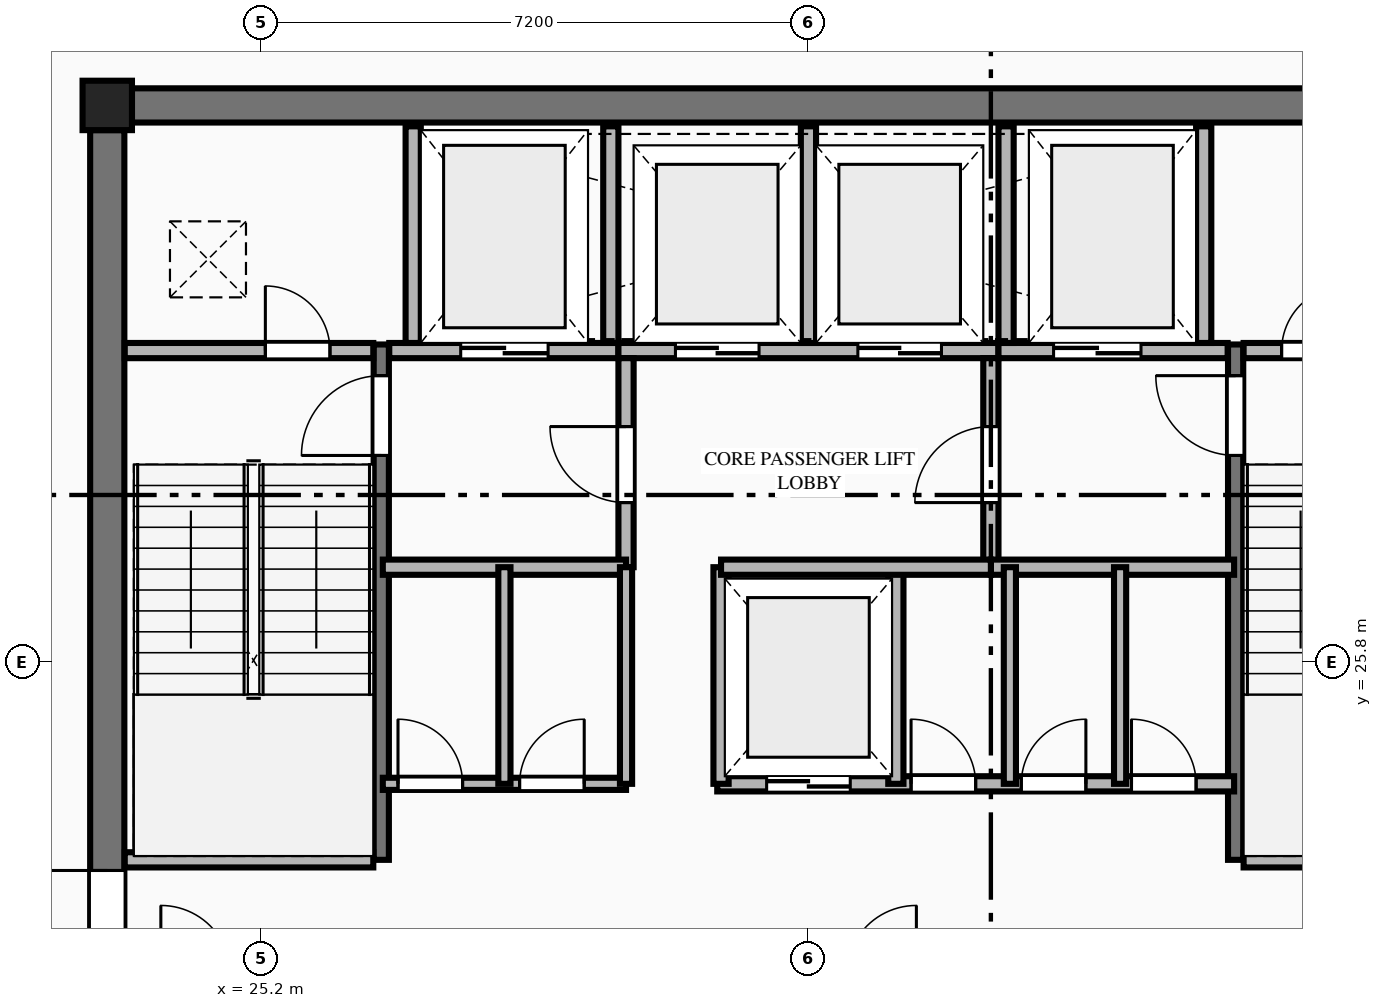
"""IFC4 building model, lengths in metres.
Left out: names, types, materials, properties, quantities, classifications, styles, units other than length and angle.
Written with IfcOpenShell. Run it as: python <this file> out.ifc"""

import sys

from ifc_helpers import new_model, si_unit, direction, frame, frame_2d, origin, origin_2d, place, context, subcontext, project, spatial, rectangle, extrude, element, fill, save


model = new_model("IFC4")
c1 = context("Model", 3, precision=1e-05, world=origin(), true_north=direction((0.0, 1.0)))
c2 = subcontext(c1, "Body", "Model", "MODEL_VIEW")
j1 = project(units=[si_unit("LENGTHUNIT", "METRE"), si_unit("PLANEANGLEUNIT", "RADIAN")], contexts=[c1])
p1 = place(None, origin())
s1 = spatial("IfcSite", under=j1, at=p1, CompositionType="ELEMENT")
p2 = place(p1, origin())
s2 = spatial("IfcBuilding", under=s1, at=p2, CompositionType="ELEMENT")
p3 = place(p2, frame((0.0, 0.0, 283.5)))
s3 = spatial("IfcBuildingStorey", under=s2, at=p3, CompositionType="ELEMENT", Elevation=283.5)
p4 = place(p3, frame((23.175, 33.125, 0.0), z_axis=(0.0, 0.0, 1.0), x_axis=(1.0, 0.0, 0.0)))
e1 = element("IfcColumn", 1, at=p4, inside=s3, PredefinedType="COLUMN", context=c2, shape_type="SweptSolid", body=[
    extrude(rectangle(XDim=0.65, YDim=0.65, at=origin_2d()), origin(), (0.0, 0.0, 1.0), 4.0),
])
p5 = place(p3, frame((23.5, 33.125, 0.0), z_axis=(0.0, 0.0, 1.0), x_axis=(1.0, 0.0, 0.0)))
e2 = element("IfcWall", 2, at=p5, inside=s3, PredefinedType="SHEAR", context=c2, shape_type="SweptSolid", body=[
    extrude(rectangle(XDim=17.8, YDim=0.45, at=frame_2d((8.9, 0.0))), origin(), (0.0, 0.0, 1.0), 3.8),
])
p6 = place(p3, frame((23.175, 19.0, 0.0), z_axis=(0.0, 0.0, 1.0), x_axis=(0.0, 1.0, 0.0)))
e3 = element("IfcWall", 3, at=p6, inside=s3, PredefinedType="SHEAR", context=c2, shape_type="SweptSolid", body=[
    extrude(rectangle(XDim=13.8, YDim=0.45, at=frame_2d((6.9, 0.0))), origin(), (0.0, 0.0, 1.0), 3.8),
])
p7 = place(p6, frame((2.84, 0.0, 0.0)))
e4 = element("IfcOpeningElement", 4, at=p7, cuts=e3, PredefinedType="OPENING", context=c2, shape_type="SweptSolid", body=[
    extrude(rectangle(XDim=1.22, YDim=2.25, at=frame_2d((0.61, 1.125))), frame((0.0, 0.235, 0.0), z_axis=(0.0, -1.0, 0.0), x_axis=(1.0, 0.0, 0.0)), (0.0, 0.0, 1.0), 0.47),
])
p8 = place(p3, frame((26.78, 23.2, 0.0), z_axis=(0.0, 0.0, 1.0), x_axis=(0.0, 1.0, 0.0)))
e5 = element("IfcWall", 5, at=p8, inside=s3, PredefinedType="SHEAR", context=c2, shape_type="SweptSolid", body=[
    extrude(rectangle(XDim=6.78, YDim=0.2, at=frame_2d((3.39, 0.0))), origin(), (0.0, 0.0, 1.0), 4.0),
])
p9 = place(p8, frame((5.32, 0.0, 0.0)))
e6 = element("IfcOpeningElement", 6, at=p9, cuts=e5, PredefinedType="OPENING", context=c2, shape_type="SweptSolid", body=[
    extrude(rectangle(XDim=1.05, YDim=2.15, at=frame_2d((0.525, 1.075))), frame((0.0, 0.11, 0.0), z_axis=(0.0, -1.0, 0.0), x_axis=(1.0, 0.0, 0.0)), (0.0, 0.0, 1.0), 0.22),
])
p10 = place(p3, frame((23.405, 23.2, 0.0), z_axis=(0.0, 0.0, 1.0), x_axis=(1.0, 0.0, 0.0)))
e7 = element("IfcWall", 7, at=p10, inside=s3, PredefinedType="PLUMBINGWALL", context=c2, shape_type="SweptSolid", body=[
    extrude(rectangle(XDim=3.27, YDim=0.2, at=frame_2d((1.635, 0.0))), origin(), (0.0, 0.0, 1.0), 3.8),
])
p11 = place(p3, frame((38.02, 23.2, 0.0), z_axis=(0.0, 0.0, 1.0), x_axis=(0.0, 1.0, 0.0)))
e8 = element("IfcWall", 8, at=p11, inside=s3, PredefinedType="SHEAR", context=c2, shape_type="SweptSolid", body=[
    extrude(rectangle(XDim=6.78, YDim=0.2, at=frame_2d((3.39, 0.0))), origin(), (0.0, 0.0, 1.0), 4.0),
])
p12 = place(p11, frame((5.32, 0.0, 0.0)))
e9 = element("IfcOpeningElement", 9, at=p12, cuts=e8, PredefinedType="OPENING", context=c2, shape_type="SweptSolid", body=[
    extrude(rectangle(XDim=1.05, YDim=2.15, at=frame_2d((0.525, 1.075))), frame((0.0, 0.11, 0.0), z_axis=(0.0, -1.0, 0.0), x_axis=(1.0, 0.0, 0.0)), (0.0, 0.0, 1.0), 0.22),
])
p13 = place(p3, frame((38.125, 23.2, 0.0), z_axis=(0.0, 0.0, 1.0), x_axis=(1.0, 0.0, 0.0)))
e10 = element("IfcWall", 10, at=p13, inside=s3, PredefinedType="PLUMBINGWALL", context=c2, shape_type="SweptSolid", body=[
    extrude(rectangle(XDim=3.27, YDim=0.2, at=frame_2d((1.635, 0.0))), origin(), (0.0, 0.0, 1.0), 3.8),
])
p14 = place(p3, frame((23.405, 29.9, 0.0), z_axis=(0.0, 0.0, 1.0), x_axis=(1.0, 0.0, 0.0)))
e11 = element("IfcWall", 11, at=p14, inside=s3, PredefinedType="PLUMBINGWALL", context=c2, shape_type="SweptSolid", body=[
    extrude(rectangle(XDim=3.27, YDim=0.2, at=frame_2d((1.635, 0.0))), origin(), (0.0, 0.0, 1.0), 3.8),
])
p15 = place(p14, frame((1.85, 0.0, 0.0)))
e12 = element("IfcOpeningElement", 12, at=p15, cuts=e11, PredefinedType="OPENING", context=c2, shape_type="SweptSolid", body=[
    extrude(rectangle(XDim=0.85, YDim=2.05, at=frame_2d((0.425, 1.025))), frame((0.0, 0.11, 0.0), z_axis=(0.0, -1.0, 0.0), x_axis=(1.0, 0.0, 0.0)), (0.0, 0.0, 1.0), 0.22),
])
p16 = place(p3, frame((26.885, 29.9, 0.0), z_axis=(0.0, 0.0, 1.0), x_axis=(1.0, 0.0, 0.0)))
e13 = element("IfcWall", 13, at=p16, inside=s3, PredefinedType="PLUMBINGWALL", context=c2, shape_type="SweptSolid", body=[
    extrude(rectangle(XDim=3.015, YDim=0.2, at=frame_2d((1.507, 0.0))), origin(), (0.0, 0.0, 1.0), 3.8),
])
p17 = place(p16, frame((0.94, 0.0, 0.0)))
e14 = element("IfcOpeningElement", 14, at=p17, cuts=e13, PredefinedType="OPENING", context=c2, shape_type="SweptSolid", body=[
    extrude(rectangle(XDim=1.15, YDim=2.2, at=frame_2d((0.575, 1.1))), frame((0.0, 0.11, 0.0), z_axis=(0.0, -1.0, 0.0), x_axis=(1.0, 0.0, 0.0)), (0.0, 0.0, 1.0), 0.22),
])
p18 = place(p3, frame((29.9, 29.9, 0.0), z_axis=(0.0, 0.0, 1.0), x_axis=(1.0, 0.0, 0.0)))
e15 = element("IfcWall", 15, at=p18, inside=s3, PredefinedType="PLUMBINGWALL", context=c2, shape_type="SweptSolid", body=[
    extrude(rectangle(XDim=5.0, YDim=0.2, at=frame_2d((2.5, 0.0))), origin(), (0.0, 0.0, 1.0), 3.8),
])
p19 = place(p18, frame((0.75, 0.0, 0.0)))
e16 = element("IfcOpeningElement", 16, at=p19, cuts=e15, PredefinedType="OPENING", context=c2, shape_type="SweptSolid", body=[
    extrude(rectangle(XDim=1.1, YDim=2.2, at=frame_2d((0.55, 1.1))), frame((0.0, 0.11, 0.0), z_axis=(0.0, -1.0, 0.0), x_axis=(1.0, 0.0, 0.0)), (0.0, 0.0, 1.0), 0.22),
])
p20 = place(p18, frame((3.15, 0.0, 0.0)))
e17 = element("IfcOpeningElement", 17, at=p20, cuts=e15, PredefinedType="OPENING", context=c2, shape_type="SweptSolid", body=[
    extrude(rectangle(XDim=1.1, YDim=2.2, at=frame_2d((0.55, 1.1))), frame((0.0, 0.11, 0.0), z_axis=(0.0, -1.0, 0.0), x_axis=(1.0, 0.0, 0.0)), (0.0, 0.0, 1.0), 0.22),
])
p21 = place(p3, frame((34.9, 29.9, 0.0), z_axis=(0.0, 0.0, 1.0), x_axis=(1.0, 0.0, 0.0)))
e18 = element("IfcWall", 18, at=p21, inside=s3, PredefinedType="PLUMBINGWALL", context=c2, shape_type="SweptSolid", body=[
    extrude(rectangle(XDim=3.015, YDim=0.2, at=frame_2d((1.508, 0.0))), origin(), (0.0, 0.0, 1.0), 3.8),
])
p22 = place(p21, frame((0.725, 0.0, 0.0)))
e19 = element("IfcOpeningElement", 19, at=p22, cuts=e18, PredefinedType="OPENING", context=c2, shape_type="SweptSolid", body=[
    extrude(rectangle(XDim=1.15, YDim=2.2, at=frame_2d((0.575, 1.1))), frame((0.0, 0.11, 0.0), z_axis=(0.0, -1.0, 0.0), x_axis=(1.0, 0.0, 0.0)), (0.0, 0.0, 1.0), 0.22),
])
p23 = place(p3, frame((38.125, 29.9, 0.0), z_axis=(0.0, 0.0, 1.0), x_axis=(1.0, 0.0, 0.0)))
e20 = element("IfcWall", 20, at=p23, inside=s3, PredefinedType="PLUMBINGWALL", context=c2, shape_type="SweptSolid", body=[
    extrude(rectangle(XDim=3.27, YDim=0.2, at=frame_2d((1.635, 0.0))), origin(), (0.0, 0.0, 1.0), 3.8),
])
p24 = place(p23, frame((0.5, 0.0, 0.0)))
e21 = element("IfcOpeningElement", 21, at=p24, cuts=e20, PredefinedType="OPENING", context=c2, shape_type="SweptSolid", body=[
    extrude(rectangle(XDim=0.85, YDim=2.05, at=frame_2d((0.425, 1.025))), frame((0.0, 0.11, 0.0), z_axis=(0.0, -1.0, 0.0), x_axis=(1.0, 0.0, 0.0)), (0.0, 0.0, 1.0), 0.22),
])
for number, where, z_axis, x_axis in (
    (22, (27.2, 30.0, 0.0), (0.0, 0.0, 1.0), (0.0, 1.0, 0.0)),
    (23, (29.8, 30.0, 0.0), (0.0, 0.0, 1.0), (0.0, 1.0, 0.0)),
    (24, (32.4, 30.0, 0.0), (0.0, 0.0, 1.0), (0.0, 1.0, 0.0)),
    (25, (35.0, 30.0, 0.0), (0.0, 0.0, 1.0), (0.0, 1.0, 0.0)),
    (26, (37.6, 30.0, 0.0), (0.0, 0.0, 1.0), (0.0, 1.0, 0.0)),
):
    element("IfcWall", number, at=place(p3, frame(where, z_axis=z_axis, x_axis=x_axis)), inside=s3, PredefinedType="PLUMBINGWALL", context=c2, shape_type="SweptSolid", body=[
        extrude(rectangle(XDim=2.85, YDim=0.2, at=frame_2d((1.425, 0.0))), origin(), (0.0, 0.0, 1.0), 3.8),
    ])
p25 = place(p3, frame((30.0, 27.05, 0.0), z_axis=(0.0, 0.0, 1.0), x_axis=(0.0, 1.0, 0.0)))
e27 = element("IfcWall", 27, at=p25, inside=s3, PredefinedType="PLUMBINGWALL", context=c2, shape_type="SweptSolid", body=[
    extrude(rectangle(XDim=2.75, YDim=0.2, at=frame_2d((1.375, 0.0))), origin(), (0.0, 0.0, 1.0), 3.8),
])
p26 = place(p25, frame((0.85, 0.0, 0.0)))
e28 = element("IfcOpeningElement", 28, at=p26, cuts=e27, PredefinedType="OPENING", context=c2, shape_type="SweptSolid", body=[
    extrude(rectangle(XDim=1.0, YDim=2.15, at=frame_2d((0.5, 1.075))), frame((0.0, 0.11, 0.0), z_axis=(0.0, -1.0, 0.0), x_axis=(1.0, 0.0, 0.0)), (0.0, 0.0, 1.0), 0.22),
])
p27 = place(p3, frame((26.8, 27.05, 0.0), z_axis=(0.0, 0.0, 1.0), x_axis=(1.0, 0.0, 0.0)))
e29 = element("IfcWall", 29, at=p27, inside=s3, PredefinedType="PLUMBINGWALL", context=c2, shape_type="SweptSolid", body=[
    extrude(rectangle(XDim=3.2, YDim=0.2, at=frame_2d((1.6, 0.0))), origin(), (0.0, 0.0, 1.0), 3.8),
])
p28 = place(p3, frame((34.8, 27.05, 0.0), z_axis=(0.0, 0.0, 1.0), x_axis=(0.0, 1.0, 0.0)))
e30 = element("IfcWall", 30, at=p28, inside=s3, PredefinedType="PLUMBINGWALL", context=c2, shape_type="SweptSolid", body=[
    extrude(rectangle(XDim=2.75, YDim=0.2, at=frame_2d((1.375, 0.0))), origin(), (0.0, 0.0, 1.0), 3.8),
])
p29 = place(p28, frame((0.85, 0.0, 0.0)))
e31 = element("IfcOpeningElement", 31, at=p29, cuts=e30, PredefinedType="OPENING", context=c2, shape_type="SweptSolid", body=[
    extrude(rectangle(XDim=1.0, YDim=2.15, at=frame_2d((0.5, 1.075))), frame((0.0, 0.11, 0.0), z_axis=(0.0, -1.0, 0.0), x_axis=(1.0, 0.0, 0.0)), (0.0, 0.0, 1.0), 0.22),
])
p30 = place(p3, frame((34.8, 27.05, 0.0), z_axis=(0.0, 0.0, 1.0), x_axis=(1.0, 0.0, 0.0)))
e32 = element("IfcWall", 32, at=p30, inside=s3, PredefinedType="PLUMBINGWALL", context=c2, shape_type="SweptSolid", body=[
    extrude(rectangle(XDim=3.2, YDim=0.2, at=frame_2d((1.6, 0.0))), origin(), (0.0, 0.0, 1.0), 3.8),
])
p31 = place(p3, frame((26.8, 24.2, 0.0), z_axis=(0.0, 0.0, 1.0), x_axis=(1.0, 0.0, 0.0)))
e33 = element("IfcWall", 33, at=p31, inside=s3, PredefinedType="PARTITIONING", context=c2, shape_type="SweptSolid", body=[
    extrude(rectangle(XDim=3.2, YDim=0.16, at=frame_2d((1.6, 0.0))), origin(), (0.0, 0.0, 1.0), 3.8),
])
p32 = place(p31, frame((0.2, 0.0, 0.0)))
e34 = element("IfcOpeningElement", 34, at=p32, cuts=e33, PredefinedType="OPENING", context=c2, shape_type="SweptSolid", body=[
    extrude(rectangle(XDim=0.85, YDim=2.05, at=frame_2d((0.425, 1.025))), frame((0.0, 0.09, 0.0), z_axis=(0.0, -1.0, 0.0), x_axis=(1.0, 0.0, 0.0)), (0.0, 0.0, 1.0), 0.18),
])
p33 = place(p31, frame((1.8, 0.0, 0.0)))
e35 = element("IfcOpeningElement", 35, at=p33, cuts=e33, PredefinedType="OPENING", context=c2, shape_type="SweptSolid", body=[
    extrude(rectangle(XDim=0.85, YDim=2.05, at=frame_2d((0.425, 1.025))), frame((0.0, 0.09, 0.0), z_axis=(0.0, -1.0, 0.0), x_axis=(1.0, 0.0, 0.0)), (0.0, 0.0, 1.0), 0.18),
])
p34 = place(p3, frame((30.0, 24.2, 0.0), z_axis=(0.0, 0.0, 1.0), x_axis=(0.0, 1.0, 0.0)))
e36 = element("IfcWall", 36, at=p34, inside=s3, PredefinedType="PARTITIONING", context=c2, shape_type="SweptSolid", body=[
    extrude(rectangle(XDim=2.85, YDim=0.16, at=frame_2d((1.425, 0.0))), origin(), (0.0, 0.0, 1.0), 3.8),
])
p35 = place(p3, frame((31.2, 24.2, 0.0), z_axis=(0.0, 0.0, 1.0), x_axis=(1.0, 0.0, 0.0)))
e37 = element("IfcWall", 37, at=p35, inside=s3, PredefinedType="PLUMBINGWALL", context=c2, shape_type="SweptSolid", body=[
    extrude(rectangle(XDim=6.8, YDim=0.2, at=frame_2d((3.4, 0.0))), origin(), (0.0, 0.0, 1.0), 3.8),
])
p36 = place(p35, frame((0.65, 0.0, 0.0)))
e38 = element("IfcOpeningElement", 38, at=p36, cuts=e37, PredefinedType="OPENING", context=c2, shape_type="SweptSolid", body=[
    extrude(rectangle(XDim=1.1, YDim=2.2, at=frame_2d((0.55, 1.1))), frame((0.0, 0.11, 0.0), z_axis=(0.0, -1.0, 0.0), x_axis=(1.0, 0.0, 0.0)), (0.0, 0.0, 1.0), 0.22),
])
p37 = place(p35, frame((2.55, 0.0, 0.0)))
e39 = element("IfcOpeningElement", 39, at=p37, cuts=e37, PredefinedType="OPENING", context=c2, shape_type="SweptSolid", body=[
    extrude(rectangle(XDim=0.85, YDim=2.05, at=frame_2d((0.425, 1.025))), frame((0.0, 0.11, 0.0), z_axis=(0.0, -1.0, 0.0), x_axis=(1.0, 0.0, 0.0)), (0.0, 0.0, 1.0), 0.22),
])
p38 = place(p35, frame((4.0, 0.0, 0.0)))
e40 = element("IfcOpeningElement", 40, at=p38, cuts=e37, PredefinedType="OPENING", context=c2, shape_type="SweptSolid", body=[
    extrude(rectangle(XDim=0.85, YDim=2.05, at=frame_2d((0.425, 1.025))), frame((0.0, 0.11, 0.0), z_axis=(0.0, -1.0, 0.0), x_axis=(1.0, 0.0, 0.0)), (0.0, 0.0, 1.0), 0.22),
])
p39 = place(p35, frame((5.45, 0.0, 0.0)))
e41 = element("IfcOpeningElement", 41, at=p39, cuts=e37, PredefinedType="OPENING", context=c2, shape_type="SweptSolid", body=[
    extrude(rectangle(XDim=0.85, YDim=2.05, at=frame_2d((0.425, 1.025))), frame((0.0, 0.11, 0.0), z_axis=(0.0, -1.0, 0.0), x_axis=(1.0, 0.0, 0.0)), (0.0, 0.0, 1.0), 0.22),
])
for number, where, z_axis, x_axis in (
    (42, (31.25, 24.2, 0.0), (0.0, 0.0, 1.0), (0.0, 1.0, 0.0)),
    (43, (33.55, 24.2, 0.0), (0.0, 0.0, 1.0), (0.0, 1.0, 0.0)),
):
    element("IfcWall", number, at=place(p3, frame(where, z_axis=z_axis, x_axis=x_axis)), inside=s3, PredefinedType="PLUMBINGWALL", context=c2, shape_type="SweptSolid", body=[
        extrude(rectangle(XDim=2.85, YDim=0.2, at=frame_2d((1.425, 0.0))), origin(), (0.0, 0.0, 1.0), 3.8),
    ])
p40 = place(p3, frame((31.25, 27.05, 0.0), z_axis=(0.0, 0.0, 1.0), x_axis=(1.0, 0.0, 0.0)))
e44 = element("IfcWall", 44, at=p40, inside=s3, PredefinedType="PLUMBINGWALL", context=c2, shape_type="SweptSolid", body=[
    extrude(rectangle(XDim=3.55, YDim=0.2, at=frame_2d((1.775, 0.0))), origin(), (0.0, 0.0, 1.0), 3.8),
])
for number, where, z_axis, x_axis in (
    (45, (28.4, 24.2, 0.0), (0.0, 0.0, 1.0), (0.0, 1.0, 0.0)),
    (46, (35.05, 24.2, 0.0), (0.0, 0.0, 1.0), (0.0, 1.0, 0.0)),
    (47, (36.5, 24.2, 0.0), (0.0, 0.0, 1.0), (0.0, 1.0, 0.0)),
):
    element("IfcWall", number, at=place(p3, frame(where, z_axis=z_axis, x_axis=x_axis)), inside=s3, PredefinedType="PARTITIONING", context=c2, shape_type="SweptSolid", body=[
        extrude(rectangle(XDim=2.85, YDim=0.16, at=frame_2d((1.425, 0.0))), origin(), (0.0, 0.0, 1.0), 3.8),
    ])
p41 = place(p7, origin())
e48 = element("IfcDoor", 48, at=p41, inside=s3, OperationType="SINGLE_SWING_RIGHT", PredefinedType="DOOR", context=c2, shape_type="SweptSolid", body=[
    extrude(rectangle(XDim=1.22, YDim=2.25, at=frame_2d((0.61, 1.125))), frame((0.0, 0.025, 0.0), z_axis=(0.0, -1.0, 0.0), x_axis=(1.0, 0.0, 0.0)), (0.0, 0.0, 1.0), 0.05),
])
fill(e4, e48)
p42 = place(p9, origin())
e49 = element("IfcDoor", 49, at=p42, inside=s3, OperationType="SINGLE_SWING_LEFT", PredefinedType="DOOR", context=c2, shape_type="SweptSolid", body=[
    extrude(rectangle(XDim=1.05, YDim=2.15, at=frame_2d((0.525, 1.075))), frame((0.0, 0.025, 0.0), z_axis=(0.0, -1.0, 0.0), x_axis=(1.0, 0.0, 0.0)), (0.0, 0.0, 1.0), 0.05),
])
fill(e6, e49)
p43 = place(p12, origin())
e50 = element("IfcDoor", 50, at=p43, inside=s3, OperationType="SINGLE_SWING_RIGHT", PredefinedType="DOOR", context=c2, shape_type="SweptSolid", body=[
    extrude(rectangle(XDim=1.05, YDim=2.15, at=frame_2d((0.525, 1.075))), frame((0.0, 0.025, 0.0), z_axis=(0.0, -1.0, 0.0), x_axis=(1.0, 0.0, 0.0)), (0.0, 0.0, 1.0), 0.05),
])
fill(e9, e50)
p44 = place(p15, origin())
e51 = element("IfcDoor", 51, at=p44, inside=s3, OperationType="SINGLE_SWING_LEFT", PredefinedType="DOOR", context=c2, shape_type="SweptSolid", body=[
    extrude(rectangle(XDim=0.85, YDim=2.05, at=frame_2d((0.425, 1.025))), frame((0.0, 0.025, 0.0), z_axis=(0.0, -1.0, 0.0), x_axis=(1.0, 0.0, 0.0)), (0.0, 0.0, 1.0), 0.05),
])
fill(e12, e51)
p45 = place(p24, origin())
e52 = element("IfcDoor", 52, at=p45, inside=s3, OperationType="SINGLE_SWING_RIGHT", PredefinedType="DOOR", context=c2, shape_type="SweptSolid", body=[
    extrude(rectangle(XDim=0.85, YDim=2.05, at=frame_2d((0.425, 1.025))), frame((0.0, 0.025, 0.0), z_axis=(0.0, -1.0, 0.0), x_axis=(1.0, 0.0, 0.0)), (0.0, 0.0, 1.0), 0.05),
])
fill(e21, e52)
p46 = place(p17, origin())
e53 = element("IfcDoor", 53, at=p46, inside=s3, OperationType="DOUBLE_DOOR_SLIDING", PredefinedType="DOOR", context=c2, shape_type="SweptSolid", body=[
    extrude(rectangle(XDim=1.15, YDim=2.2, at=frame_2d((0.575, 1.1))), frame((0.0, 0.025, 0.0), z_axis=(0.0, -1.0, 0.0), x_axis=(1.0, 0.0, 0.0)), (0.0, 0.0, 1.0), 0.05),
])
fill(e14, e53)
p47 = place(p22, origin())
e54 = element("IfcDoor", 54, at=p47, inside=s3, OperationType="DOUBLE_DOOR_SLIDING", PredefinedType="DOOR", context=c2, shape_type="SweptSolid", body=[
    extrude(rectangle(XDim=1.15, YDim=2.2, at=frame_2d((0.575, 1.1))), frame((0.0, 0.025, 0.0), z_axis=(0.0, -1.0, 0.0), x_axis=(1.0, 0.0, 0.0)), (0.0, 0.0, 1.0), 0.05),
])
fill(e19, e54)
p48 = place(p19, origin())
e55 = element("IfcDoor", 55, at=p48, inside=s3, OperationType="DOUBLE_DOOR_SLIDING", PredefinedType="DOOR", context=c2, shape_type="SweptSolid", body=[
    extrude(rectangle(XDim=1.1, YDim=2.2, at=frame_2d((0.55, 1.1))), frame((0.0, 0.025, 0.0), z_axis=(0.0, -1.0, 0.0), x_axis=(1.0, 0.0, 0.0)), (0.0, 0.0, 1.0), 0.05),
])
fill(e16, e55)
p49 = place(p20, origin())
e56 = element("IfcDoor", 56, at=p49, inside=s3, OperationType="DOUBLE_DOOR_SLIDING", PredefinedType="DOOR", context=c2, shape_type="SweptSolid", body=[
    extrude(rectangle(XDim=1.1, YDim=2.2, at=frame_2d((0.55, 1.1))), frame((0.0, 0.025, 0.0), z_axis=(0.0, -1.0, 0.0), x_axis=(1.0, 0.0, 0.0)), (0.0, 0.0, 1.0), 0.05),
])
fill(e17, e56)
p50 = place(p26, origin())
e57 = element("IfcDoor", 57, at=p50, inside=s3, OperationType="SINGLE_SWING_RIGHT", PredefinedType="DOOR", context=c2, shape_type="SweptSolid", body=[
    extrude(rectangle(XDim=1.0, YDim=2.15, at=frame_2d((0.5, 1.075))), frame((0.0, 0.025, 0.0), z_axis=(0.0, -1.0, 0.0), x_axis=(1.0, 0.0, 0.0)), (0.0, 0.0, 1.0), 0.05),
])
fill(e28, e57)
p51 = place(p29, origin())
e58 = element("IfcDoor", 58, at=p51, inside=s3, OperationType="SINGLE_SWING_LEFT", PredefinedType="DOOR", context=c2, shape_type="SweptSolid", body=[
    extrude(rectangle(XDim=1.0, YDim=2.15, at=frame_2d((0.5, 1.075))), frame((0.0, 0.025, 0.0), z_axis=(0.0, -1.0, 0.0), x_axis=(1.0, 0.0, 0.0)), (0.0, 0.0, 1.0), 0.05),
])
fill(e31, e58)
p52 = place(p36, origin())
e59 = element("IfcDoor", 59, at=p52, inside=s3, OperationType="DOUBLE_DOOR_SLIDING", PredefinedType="DOOR", context=c2, shape_type="SweptSolid", body=[
    extrude(rectangle(XDim=1.1, YDim=2.2, at=frame_2d((0.55, 1.1))), frame((0.0, 0.025, 0.0), z_axis=(0.0, -1.0, 0.0), x_axis=(1.0, 0.0, 0.0)), (0.0, 0.0, 1.0), 0.05),
])
fill(e38, e59)
p53 = place(p32, origin())
e60 = element("IfcDoor", 60, at=p53, inside=s3, OperationType="SINGLE_SWING_LEFT", PredefinedType="DOOR", context=c2, shape_type="SweptSolid", body=[
    extrude(rectangle(XDim=0.85, YDim=2.05, at=frame_2d((0.425, 1.025))), frame((0.0, 0.025, 0.0), z_axis=(0.0, -1.0, 0.0), x_axis=(1.0, 0.0, 0.0)), (0.0, 0.0, 1.0), 0.05),
])
fill(e34, e60)
p54 = place(p33, origin())
e61 = element("IfcDoor", 61, at=p54, inside=s3, OperationType="SINGLE_SWING_RIGHT", PredefinedType="DOOR", context=c2, shape_type="SweptSolid", body=[
    extrude(rectangle(XDim=0.85, YDim=2.05, at=frame_2d((0.425, 1.025))), frame((0.0, 0.025, 0.0), z_axis=(0.0, -1.0, 0.0), x_axis=(1.0, 0.0, 0.0)), (0.0, 0.0, 1.0), 0.05),
])
fill(e35, e61)
p55 = place(p37, origin())
e62 = element("IfcDoor", 62, at=p55, inside=s3, OperationType="SINGLE_SWING_LEFT", PredefinedType="DOOR", context=c2, shape_type="SweptSolid", body=[
    extrude(rectangle(XDim=0.85, YDim=2.05, at=frame_2d((0.425, 1.025))), frame((0.0, 0.025, 0.0), z_axis=(0.0, -1.0, 0.0), x_axis=(1.0, 0.0, 0.0)), (0.0, 0.0, 1.0), 0.05),
])
fill(e39, e62)
p56 = place(p38, origin())
e63 = element("IfcDoor", 63, at=p56, inside=s3, OperationType="SINGLE_SWING_RIGHT", PredefinedType="DOOR", context=c2, shape_type="SweptSolid", body=[
    extrude(rectangle(XDim=0.85, YDim=2.05, at=frame_2d((0.425, 1.025))), frame((0.0, 0.025, 0.0), z_axis=(0.0, -1.0, 0.0), x_axis=(1.0, 0.0, 0.0)), (0.0, 0.0, 1.0), 0.05),
])
fill(e40, e63)
p57 = place(p39, origin())
e64 = element("IfcDoor", 64, at=p57, inside=s3, OperationType="SINGLE_SWING_LEFT", PredefinedType="DOOR", context=c2, shape_type="SweptSolid", body=[
    extrude(rectangle(XDim=0.85, YDim=2.05, at=frame_2d((0.425, 1.025))), frame((0.0, 0.025, 0.0), z_axis=(0.0, -1.0, 0.0), x_axis=(1.0, 0.0, 0.0)), (0.0, 0.0, 1.0), 0.05),
])
fill(e41, e64)
save(model, sys.argv[1])
